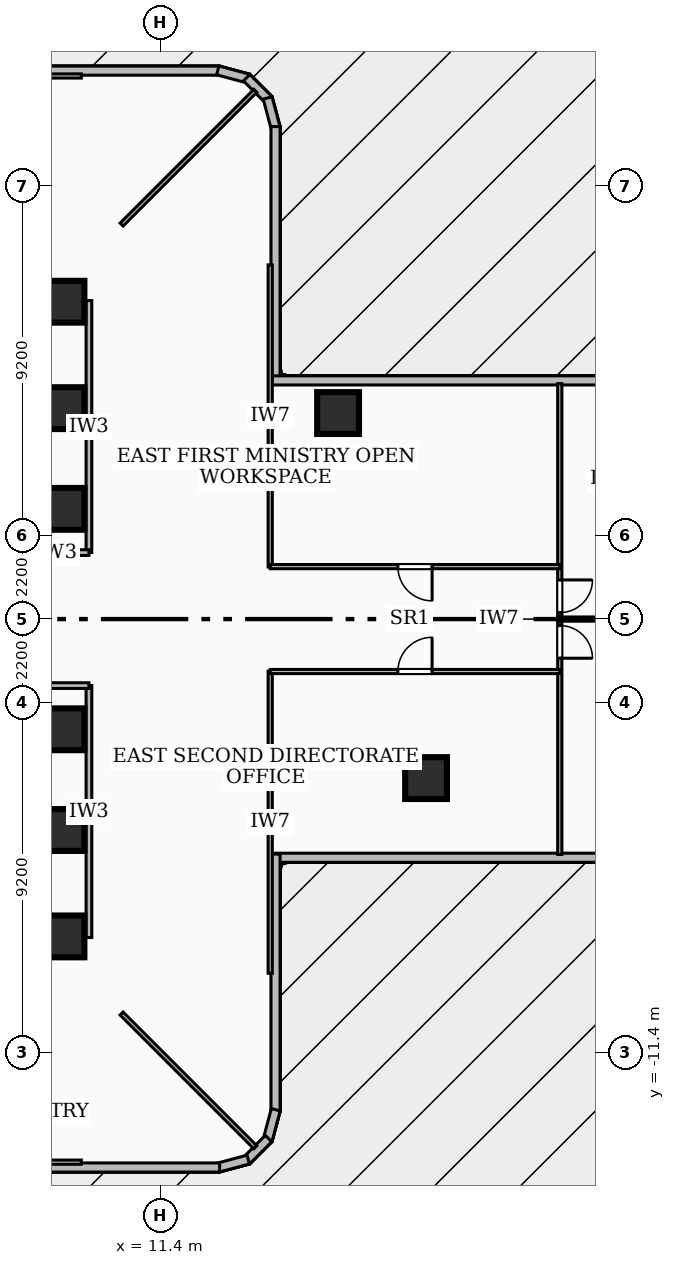
"""IFC4 building model, lengths in metres.
Left out: names, types, materials, properties, quantities, classifications, styles, units other than length and angle.
Written with IfcOpenShell. Run it as: python <this file> out.ifc"""

import sys

from ifc_helpers import new_model, si_unit, direction, frame, frame_2d, origin, origin_2d, place, context, subcontext, project, spatial, rectangle, extrude, element, fill, save


model = new_model("IFC4")
c1 = context("Model", 3, precision=1e-05, world=origin(), true_north=direction((0.0, 1.0)))
c2 = subcontext(c1, "Body", "Model", "MODEL_VIEW")
j1 = project(units=[si_unit("LENGTHUNIT", "METRE"), si_unit("PLANEANGLEUNIT", "RADIAN")], contexts=[c1])
p1 = place(None, origin())
s1 = spatial("IfcSite", under=j1, at=p1, CompositionType="ELEMENT")
p2 = place(p1, origin())
s2 = spatial("IfcBuilding", under=s1, at=p2, CompositionType="ELEMENT")
p3 = place(p2, frame((0.0, 0.0, 24.48)))
s3 = spatial("IfcBuildingStorey", under=s2, at=p3, CompositionType="ELEMENT", Elevation=24.48)
for number, where, z_axis, x_axis in (
    (1, (-8.78, 8.585, 0.0), (0.0, 0.0, 1.0), (1.0, 0.0, 0.0)),
    (2, (8.78, -8.585, 0.0), (0.0, 0.0, 1.0), (-1.0, 0.0, 0.0)),
):
    element("IfcWall", number, at=place(p3, frame(where, z_axis=z_axis, x_axis=x_axis)), inside=s3, PredefinedType="SHEAR", context=c2, shape_type="SweptSolid", body=[
        extrude(rectangle(XDim=17.56, YDim=0.55, at=frame_2d((8.78, 0.0))), origin(), (0.0, 0.0, 1.0), 3.34),
    ])
for number, where, z_axis, x_axis in (
    (3, (8.85, -5.55, 0.0), (0.0, 0.0, 1.0), (1.0, 0.0, 0.0)),
    (4, (8.85, -2.9, 0.0), (0.0, 0.0, 1.0), (1.0, 0.0, 0.0)),
    (5, (8.85, 2.9, 0.0), (0.0, 0.0, 1.0), (1.0, 0.0, 0.0)),
    (6, (8.85, 5.55, 0.0), (0.0, 0.0, 1.0), (1.0, 0.0, 0.0)),
    (7, (8.85, -8.35, 0.0), (0.0, 0.0, 1.0), (1.0, 0.0, 0.0)),
    (8, (8.85, 8.35, 0.0), (0.0, 0.0, 1.0), (1.0, 0.0, 0.0)),
    (9, (18.391, -4.184, 0.0), (0.0, 0.0, 1.0), (1.0, 0.0, 0.0)),
    (10, (16.076, 5.421, 0.0), (0.0, 0.0, 1.0), (1.0, 0.0, 0.0)),
):
    element("IfcColumn", number, at=place(p3, frame(where, z_axis=z_axis, x_axis=x_axis)), inside=s3, PredefinedType="COLUMN", context=c2, shape_type="SweptSolid", body=[
        extrude(rectangle(XDim=1.1, YDim=1.1, at=origin_2d()), origin(), (0.0, 0.0, 1.0), 3.6),
    ])
p4 = place(p3, frame((6.184, 14.43, 0.0), z_axis=(0.0, 0.0, 1.0), x_axis=(1.0, 0.0, 0.0)))
e11 = element("IfcWall", 11, at=p4, inside=s3, PredefinedType="SOLIDWALL", context=c2, shape_type="SweptSolid", body=[
    extrude(rectangle(XDim=6.775, YDim=0.24, at=frame_2d((3.387, 0.0))), origin(), (0.0, 0.0, 1.0), 3.34),
])
p5 = place(p3, frame((12.91, 14.436, 0.0), z_axis=(0.0, 0.0, 1.0), x_axis=(0.966161677396, -0.257937227116, 0.0)))
e12 = element("IfcWall", 12, at=p5, inside=s3, PredefinedType="SOLIDWALL", context=c2, shape_type="SweptSolid", body=[
    extrude(rectangle(XDim=0.83, YDim=0.24, at=frame_2d((0.415, 0.0))), origin(), (0.0, 0.0, 1.0), 3.34),
])
p6 = place(p3, frame((13.67, 14.246, 0.0), z_axis=(0.0, 0.0, 1.0), x_axis=(0.707106781187, -0.707106781187, 0.0)))
e13 = element("IfcWall", 13, at=p6, inside=s3, PredefinedType="SOLIDWALL", context=c2, shape_type="SweptSolid", body=[
    extrude(rectangle(XDim=0.815, YDim=0.24, at=frame_2d((0.407, 0.0))), origin(), (0.0, 0.0, 1.0), 3.34),
])
p7 = place(p3, frame((14.222, 13.712, 0.0), z_axis=(0.0, 0.0, 1.0), x_axis=(0.257937227116, -0.966161677396, 0.0)))
e14 = element("IfcWall", 14, at=p7, inside=s3, PredefinedType="SOLIDWALL", context=c2, shape_type="SweptSolid", body=[
    extrude(rectangle(XDim=0.83, YDim=0.24, at=frame_2d((0.415, 0.0))), origin(), (0.0, 0.0, 1.0), 3.34),
])
p8 = place(p3, frame((14.43, 12.959, 0.0), z_axis=(0.0, 0.0, 1.0), x_axis=(0.0, -1.0, 0.0)))
e15 = element("IfcWall", 15, at=p8, inside=s3, PredefinedType="SOLIDWALL", context=c2, shape_type="SweptSolid", body=[
    extrude(rectangle(XDim=6.775, YDim=0.24, at=frame_2d((3.387, 0.0))), origin(), (0.0, 0.0, 1.0), 3.34),
])
p9 = place(p3, frame((14.334, 6.28, 0.0), z_axis=(0.0, 0.0, 1.0), x_axis=(1.0, 0.0, 0.0)))
e16 = element("IfcWall", 16, at=p9, inside=s3, PredefinedType="SOLIDWALL", context=c2, shape_type="SweptSolid", body=[
    extrude(rectangle(XDim=16.875, YDim=0.24, at=frame_2d((8.438, 0.0))), origin(), (0.0, 0.0, 1.0), 3.34),
])
p10 = place(p9, frame((13.075, 0.0, 0.85)))
e17 = element("IfcOpeningElement", 17, at=p10, cuts=e16, PredefinedType="OPENING", context=c2, shape_type="SweptSolid", body=[
    extrude(rectangle(XDim=2.7, YDim=2.1, at=frame_2d((1.35, 1.05))), frame((0.0, 0.13, 0.0), z_axis=(0.0, -1.0, 0.0), x_axis=(1.0, 0.0, 0.0)), (0.0, 0.0, 1.0), 0.26),
])
p11 = place(p3, frame((31.209, -6.28, 0.0), z_axis=(0.0, 0.0, 1.0), x_axis=(-1.0, 0.0, 0.0)))
e18 = element("IfcWall", 18, at=p11, inside=s3, PredefinedType="SOLIDWALL", context=c2, shape_type="SweptSolid", body=[
    extrude(rectangle(XDim=16.875, YDim=0.24, at=frame_2d((8.438, 0.0))), origin(), (0.0, 0.0, 1.0), 3.34),
])
p12 = place(p11, frame((1.1, 0.0, 0.85)))
e19 = element("IfcOpeningElement", 19, at=p12, cuts=e18, PredefinedType="OPENING", context=c2, shape_type="SweptSolid", body=[
    extrude(rectangle(XDim=2.7, YDim=1.65, at=frame_2d((1.35, 0.825))), frame((0.0, 0.13, 0.0), z_axis=(0.0, -1.0, 0.0), x_axis=(1.0, 0.0, 0.0)), (0.0, 0.0, 1.0), 0.26),
])
p13 = place(p3, frame((14.43, -6.184, 0.0), z_axis=(0.0, 0.0, 1.0), x_axis=(0.0, -1.0, 0.0)))
e20 = element("IfcWall", 20, at=p13, inside=s3, PredefinedType="SOLIDWALL", context=c2, shape_type="SweptSolid", body=[
    extrude(rectangle(XDim=6.775, YDim=0.24, at=frame_2d((3.387, 0.0))), origin(), (0.0, 0.0, 1.0), 3.34),
])
p14 = place(p3, frame((14.436, -12.91, 0.0), z_axis=(0.0, 0.0, 1.0), x_axis=(-0.257937227116, -0.966161677396, 0.0)))
e21 = element("IfcWall", 21, at=p14, inside=s3, PredefinedType="SOLIDWALL", context=c2, shape_type="SweptSolid", body=[
    extrude(rectangle(XDim=0.83, YDim=0.24, at=frame_2d((0.415, 0.0))), origin(), (0.0, 0.0, 1.0), 3.34),
])
p15 = place(p3, frame((14.246, -13.67, 0.0), z_axis=(0.0, 0.0, 1.0), x_axis=(-0.707106781187, -0.707106781187, 0.0)))
e22 = element("IfcWall", 22, at=p15, inside=s3, PredefinedType="SOLIDWALL", context=c2, shape_type="SweptSolid", body=[
    extrude(rectangle(XDim=0.815, YDim=0.24, at=frame_2d((0.407, 0.0))), origin(), (0.0, 0.0, 1.0), 3.34),
])
p16 = place(p3, frame((13.712, -14.222, 0.0), z_axis=(0.0, 0.0, 1.0), x_axis=(-0.966161677396, -0.257937227116, 0.0)))
e23 = element("IfcWall", 23, at=p16, inside=s3, PredefinedType="SOLIDWALL", context=c2, shape_type="SweptSolid", body=[
    extrude(rectangle(XDim=0.83, YDim=0.24, at=frame_2d((0.415, 0.0))), origin(), (0.0, 0.0, 1.0), 3.34),
])
p17 = place(p3, frame((12.959, -14.43, 0.0), z_axis=(0.0, 0.0, 1.0), x_axis=(-1.0, 0.0, 0.0)))
e24 = element("IfcWall", 24, at=p17, inside=s3, PredefinedType="SOLIDWALL", context=c2, shape_type="SweptSolid", body=[
    extrude(rectangle(XDim=6.775, YDim=0.24, at=frame_2d((3.387, 0.0))), origin(), (0.0, 0.0, 1.0), 2.421),
])
p18 = place(p3, frame((9.52, 1.75, 0.0), z_axis=(0.0, 0.0, 1.0), x_axis=(0.0, 1.0, 0.0)))
e25 = element("IfcWall", 25, at=p18, inside=s3, PredefinedType="PARTITIONING", context=c2, shape_type="SweptSolid", body=[
    extrude(rectangle(XDim=6.63, YDim=0.15, at=frame_2d((3.315, 0.0))), origin(), (0.0, 0.0, 1.0), 2.421),
])
p19 = place(p3, frame((7.85, 1.75, 0.0), z_axis=(0.0, 0.0, 1.0), x_axis=(1.0, 0.0, 0.0)))
e26 = element("IfcWall", 26, at=p19, inside=s3, PredefinedType="PARTITIONING", context=c2, shape_type="SweptSolid", body=[
    extrude(rectangle(XDim=1.67, YDim=0.15, at=frame_2d((0.835, 0.0))), origin(), (0.0, 0.0, 1.0), 2.405),
])
p20 = place(p3, frame((9.52, -8.38, 0.0), z_axis=(0.0, 0.0, 1.0), x_axis=(0.0, 1.0, 0.0)))
e27 = element("IfcWall", 27, at=p20, inside=s3, PredefinedType="PARTITIONING", context=c2, shape_type="SweptSolid", body=[
    extrude(rectangle(XDim=6.63, YDim=0.15, at=frame_2d((3.315, 0.0))), origin(), (0.0, 0.0, 1.0), 2.421),
])
p21 = place(p3, frame((7.85, -1.75, 0.0), z_axis=(0.0, 0.0, 1.0), x_axis=(1.0, 0.0, 0.0)))
e28 = element("IfcWall", 28, at=p21, inside=s3, PredefinedType="PARTITIONING", context=c2, shape_type="SweptSolid", body=[
    extrude(rectangle(XDim=1.67, YDim=0.15, at=frame_2d((0.835, 0.0))), origin(), (0.0, 0.0, 1.0), 2.405),
])
for number, where, z_axis, x_axis in (
    (29, (10.38, 10.38, 0.0), (0.0, 0.0, 1.0), (0.707, 0.707, 0.0)),
    (30, (10.38, -10.38, 0.0), (0.0, 0.0, 1.0), (0.707, -0.707, 0.0)),
):
    element("IfcWall", number, at=place(p3, frame(where, z_axis=z_axis, x_axis=x_axis)), inside=s3, PredefinedType="PARTITIONING", context=c2, shape_type="SweptSolid", body=[
        extrude(rectangle(XDim=4.975, YDim=0.11, at=frame_2d((2.488, 0.0))), origin(), (0.0, 0.0, 1.0), 3.34),
    ])
for number, where, z_axis, x_axis in (
    (31, (14.29, 1.37, 0.0), (0.0, 0.0, 1.0), (0.0, 1.0, 0.0)),
    (32, (14.29, -9.32, 0.0), (0.0, 0.0, 1.0), (0.0, 1.0, 0.0)),
):
    element("IfcWall", number, at=place(p3, frame(where, z_axis=z_axis, x_axis=x_axis)), inside=s3, PredefinedType="PARTITIONING", context=c2, shape_type="SweptSolid", body=[
        extrude(rectangle(XDim=7.95, YDim=0.11, at=frame_2d((3.975, 0.0))), origin(), (0.0, 0.0, 1.0), 2.421),
    ])
p22 = place(p3, frame((21.91, 1.38, 0.0), z_axis=(0.0, 0.0, 1.0), x_axis=(-1.0, 0.0, 0.0)))
e33 = element("IfcWall", 33, at=p22, inside=s3, PredefinedType="PARTITIONING", context=c2, shape_type="SweptSolid", body=[
    extrude(rectangle(XDim=7.62, YDim=0.11, at=frame_2d((3.81, 0.0))), origin(), (0.0, 0.0, 1.0), 2.869),
])
p23 = place(p22, frame((3.36, 0.0, 0.0)))
e34 = element("IfcOpeningElement", 34, at=p23, cuts=e33, PredefinedType="OPENING", context=c2, shape_type="SweptSolid", body=[
    extrude(rectangle(XDim=0.9, YDim=2.06, at=frame_2d((0.45, 1.03))), frame((0.0, 0.065, 0.0), z_axis=(0.0, -1.0, 0.0), x_axis=(1.0, 0.0, 0.0)), (0.0, 0.0, 1.0), 0.13),
])
p24 = place(p3, frame((14.29, -1.38, 0.0), z_axis=(0.0, 0.0, 1.0), x_axis=(1.0, 0.0, 0.0)))
e35 = element("IfcWall", 35, at=p24, inside=s3, PredefinedType="PARTITIONING", context=c2, shape_type="SweptSolid", body=[
    extrude(rectangle(XDim=7.62, YDim=0.11, at=frame_2d((3.81, 0.0))), origin(), (0.0, 0.0, 1.0), 2.869),
])
p25 = place(p24, frame((3.36, 0.0, 0.0)))
e36 = element("IfcOpeningElement", 36, at=p25, cuts=e35, PredefinedType="OPENING", context=c2, shape_type="SweptSolid", body=[
    extrude(rectangle(XDim=0.9, YDim=2.06, at=frame_2d((0.45, 1.03))), frame((0.0, 0.065, 0.0), z_axis=(0.0, -1.0, 0.0), x_axis=(1.0, 0.0, 0.0)), (0.0, 0.0, 1.0), 0.13),
])
p26 = place(p3, frame((21.97, 0.0, 0.0), z_axis=(0.0, 0.0, 1.0), x_axis=(1.0, 0.0, 0.0)))
e37 = element("IfcWall", 37, at=p26, inside=s3, PredefinedType="PARTITIONING", context=c2, shape_type="SweptSolid", body=[
    extrude(rectangle(XDim=10.625, YDim=0.11, at=frame_2d((5.312, 0.0))), origin(), (0.0, 0.0, 1.0), 2.72),
])
p27 = place(p3, frame((21.91, 6.195, 0.0), z_axis=(0.0, 0.0, 1.0), x_axis=(0.0, -1.0, 0.0)))
e38 = element("IfcWall", 38, at=p27, inside=s3, PredefinedType="PARTITIONING", context=c2, shape_type="SweptSolid", body=[
    extrude(rectangle(XDim=12.39, YDim=0.11, at=frame_2d((6.195, 0.0))), origin(), (0.0, 0.0, 1.0), 2.421),
])
p28 = place(p27, frame((6.365, 0.0, 0.0)))
e39 = element("IfcOpeningElement", 39, at=p28, cuts=e38, PredefinedType="OPENING", context=c2, shape_type="SweptSolid", body=[
    extrude(rectangle(XDim=0.86, YDim=2.04, at=frame_2d((0.43, 1.02))), frame((0.0, 0.065, 0.0), z_axis=(0.0, -1.0, 0.0), x_axis=(1.0, 0.0, 0.0)), (0.0, 0.0, 1.0), 0.13),
])
p29 = place(p27, frame((5.165, 0.0, 0.0)))
e40 = element("IfcOpeningElement", 40, at=p29, cuts=e38, PredefinedType="OPENING", context=c2, shape_type="SweptSolid", body=[
    extrude(rectangle(XDim=0.86, YDim=2.04, at=frame_2d((0.43, 1.02))), frame((0.0, 0.065, 0.0), z_axis=(0.0, -1.0, 0.0), x_axis=(1.0, 0.0, 0.0)), (0.0, 0.0, 1.0), 0.13),
])
for number, where, z_axis, x_axis in (
    (41, (9.32, 14.29, 0.0), (0.0, 0.0, 1.0), (-1.0, 0.0, 0.0)),
    (42, (1.37, -14.29, 0.0), (0.0, 0.0, 1.0), (1.0, 0.0, 0.0)),
):
    element("IfcWall", number, at=place(p3, frame(where, z_axis=z_axis, x_axis=x_axis)), inside=s3, PredefinedType="PARTITIONING", context=c2, shape_type="SweptSolid", body=[
        extrude(rectangle(XDim=7.95, YDim=0.11, at=frame_2d((3.975, 0.0))), origin(), (0.0, 0.0, 1.0), 2.421),
    ])
p30 = place(p23, origin())
e43 = element("IfcDoor", 43, at=p30, inside=s3, OperationType="SINGLE_SWING_LEFT", PredefinedType="DOOR", context=c2, shape_type="SweptSolid", body=[
    extrude(rectangle(XDim=0.9, YDim=2.06, at=frame_2d((0.45, 1.03))), frame((0.0, 0.025, 0.0), z_axis=(0.0, -1.0, 0.0), x_axis=(1.0, 0.0, 0.0)), (0.0, 0.0, 1.0), 0.05),
])
fill(e34, e43)
p31 = place(p25, origin())
e44 = element("IfcDoor", 44, at=p31, inside=s3, OperationType="SINGLE_SWING_RIGHT", PredefinedType="DOOR", context=c2, shape_type="SweptSolid", body=[
    extrude(rectangle(XDim=0.9, YDim=2.06, at=frame_2d((0.45, 1.03))), frame((0.0, 0.025, 0.0), z_axis=(0.0, -1.0, 0.0), x_axis=(1.0, 0.0, 0.0)), (0.0, 0.0, 1.0), 0.05),
])
fill(e36, e44)
p32 = place(p28, origin())
e45 = element("IfcDoor", 45, at=p32, inside=s3, OperationType="SINGLE_SWING_RIGHT", PredefinedType="DOOR", context=c2, shape_type="SweptSolid", body=[
    extrude(rectangle(XDim=0.86, YDim=2.04, at=frame_2d((0.43, 1.02))), frame((0.0, 0.025, 0.0), z_axis=(0.0, -1.0, 0.0), x_axis=(1.0, 0.0, 0.0)), (0.0, 0.0, 1.0), 0.05),
])
fill(e39, e45)
p33 = place(p29, origin())
e46 = element("IfcDoor", 46, at=p33, inside=s3, OperationType="SINGLE_SWING_LEFT", PredefinedType="DOOR", context=c2, shape_type="SweptSolid", body=[
    extrude(rectangle(XDim=0.86, YDim=2.04, at=frame_2d((0.43, 1.02))), frame((0.0, 0.025, 0.0), z_axis=(0.0, -1.0, 0.0), x_axis=(1.0, 0.0, 0.0)), (0.0, 0.0, 1.0), 0.05),
])
fill(e40, e46)
save(model, sys.argv[1])
